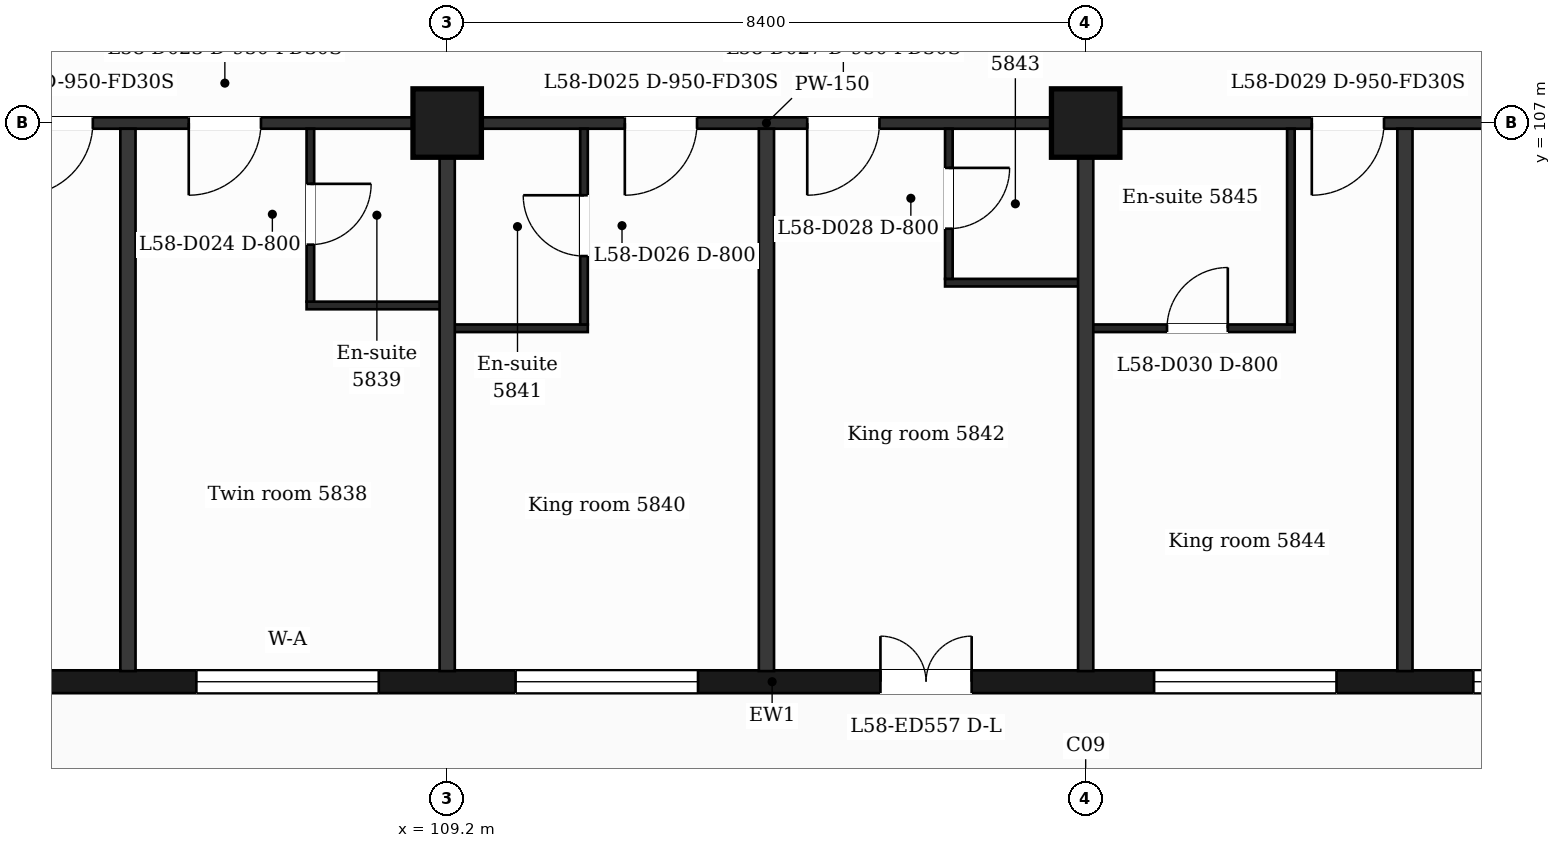
"""IFC4 building model, lengths in metres.
Left out: names, types, materials, properties, quantities, classifications, styles, units other than length and angle.
Written with IfcOpenShell. Run it as: python <this file> out.ifc"""

import sys

from ifc_helpers import new_model, si_unit, direction, frame, frame_2d, origin, origin_2d, place, context, subcontext, project, spatial, rectangle, extrude, element, fill, save


model = new_model("IFC4")
c1 = context("Model", 3, precision=1e-05, world=origin(), true_north=direction((0.0, 1.0)))
c2 = subcontext(c1, "Body", "Model", "MODEL_VIEW")
j1 = project(units=[si_unit("LENGTHUNIT", "METRE"), si_unit("PLANEANGLEUNIT", "RADIAN")], contexts=[c1])
p1 = place(None, origin())
s1 = spatial("IfcSite", under=j1, at=p1, CompositionType="ELEMENT")
p2 = place(p1, origin())
s2 = spatial("IfcBuilding", under=s1, at=p2, CompositionType="ELEMENT")
p3 = place(p2, frame((0.0, 0.0, 239.2)))
s3 = spatial("IfcBuildingStorey", under=s2, at=p3, CompositionType="ELEMENT", Elevation=239.2)
for number, where, z_axis, x_axis in (
    (1, (109.2, 107.0, 0.0), (0.0, 0.0, 1.0), (1.0, 0.0, 0.0)),
    (2, (117.6, 107.0, 0.0), (0.0, 0.0, 1.0), (1.0, 0.0, 0.0)),
):
    element("IfcColumn", number, at=place(p3, frame(where, z_axis=z_axis, x_axis=x_axis)), inside=s3, PredefinedType="COLUMN", context=c2, shape_type="SweptSolid", body=[
        extrude(rectangle(XDim=0.9, YDim=0.9, at=origin_2d()), origin(), (0.0, 0.0, 1.0), 3.7),
    ])
p4 = place(p3, frame((89.85, 99.65, 0.0), z_axis=(0.0, 0.0, 1.0), x_axis=(1.0, 0.0, 0.0)))
e3 = element("IfcWall", 3, at=p4, inside=s3, PredefinedType="SOLIDWALL", context=c2, shape_type="SweptSolid", body=[
    extrude(rectangle(XDim=47.25, YDim=0.3, at=frame_2d((23.625, 0.0))), origin(), (0.0, 0.0, 1.0), 3.38),
])
p5 = place(p4, frame((0.725, 0.0, 0.9)))
e4 = element("IfcOpeningElement", 4, at=p5, cuts=e3, PredefinedType="OPENING", context=c2, shape_type="SweptSolid", body=[
    extrude(rectangle(XDim=1.2, YDim=2.1, at=frame_2d((0.6, 1.05))), frame((0.0, 0.16, 0.0), z_axis=(0.0, -1.0, 0.0), x_axis=(1.0, 0.0, 0.0)), (0.0, 0.0, 1.0), 0.32),
])
p6 = place(p4, frame((3.45, 0.0, 0.9)))
e5 = element("IfcOpeningElement", 5, at=p6, cuts=e3, PredefinedType="OPENING", context=c2, shape_type="SweptSolid", body=[
    extrude(rectangle(XDim=2.4, YDim=2.1, at=frame_2d((1.2, 1.05))), frame((0.0, 0.16, 0.0), z_axis=(0.0, -1.0, 0.0), x_axis=(1.0, 0.0, 0.0)), (0.0, 0.0, 1.0), 0.32),
])
p7 = place(p4, frame((8.25, 0.0, 0.9)))
e6 = element("IfcOpeningElement", 6, at=p7, cuts=e3, PredefinedType="OPENING", context=c2, shape_type="SweptSolid", body=[
    extrude(rectangle(XDim=1.2, YDim=2.1, at=frame_2d((0.6, 1.05))), frame((0.0, 0.16, 0.0), z_axis=(0.0, -1.0, 0.0), x_axis=(1.0, 0.0, 0.0)), (0.0, 0.0, 1.0), 0.32),
])
p8 = place(p4, frame((12.45, 0.0, 0.9)))
e7 = element("IfcOpeningElement", 7, at=p8, cuts=e3, PredefinedType="OPENING", context=c2, shape_type="SweptSolid", body=[
    extrude(rectangle(XDim=1.2, YDim=2.1, at=frame_2d((0.6, 1.05))), frame((0.0, 0.16, 0.0), z_axis=(0.0, -1.0, 0.0), x_axis=(1.0, 0.0, 0.0)), (0.0, 0.0, 1.0), 0.32),
])
p9 = place(p4, frame((16.05, 0.0, 0.9)))
e8 = element("IfcOpeningElement", 8, at=p9, cuts=e3, PredefinedType="OPENING", context=c2, shape_type="SweptSolid", body=[
    extrude(rectangle(XDim=2.4, YDim=2.1, at=frame_2d((1.2, 1.05))), frame((0.0, 0.16, 0.0), z_axis=(0.0, -1.0, 0.0), x_axis=(1.0, 0.0, 0.0)), (0.0, 0.0, 1.0), 0.32),
])
p10 = place(p4, frame((20.25, 0.0, 0.9)))
e9 = element("IfcOpeningElement", 9, at=p10, cuts=e3, PredefinedType="OPENING", context=c2, shape_type="SweptSolid", body=[
    extrude(rectangle(XDim=2.4, YDim=2.1, at=frame_2d((1.2, 1.05))), frame((0.0, 0.16, 0.0), z_axis=(0.0, -1.0, 0.0), x_axis=(1.0, 0.0, 0.0)), (0.0, 0.0, 1.0), 0.32),
])
p11 = place(p4, frame((25.05, 0.0, 0.0)))
e10 = element("IfcOpeningElement", 10, at=p11, cuts=e3, PredefinedType="OPENING", context=c2, shape_type="SweptSolid", body=[
    extrude(rectangle(XDim=1.2, YDim=2.4, at=frame_2d((0.6, 1.2))), frame((0.0, 0.16, 0.0), z_axis=(0.0, -1.0, 0.0), x_axis=(1.0, 0.0, 0.0)), (0.0, 0.0, 1.0), 0.32),
])
p12 = place(p4, frame((28.65, 0.0, 0.9)))
e11 = element("IfcOpeningElement", 11, at=p12, cuts=e3, PredefinedType="OPENING", context=c2, shape_type="SweptSolid", body=[
    extrude(rectangle(XDim=2.4, YDim=2.1, at=frame_2d((1.2, 1.05))), frame((0.0, 0.16, 0.0), z_axis=(0.0, -1.0, 0.0), x_axis=(1.0, 0.0, 0.0)), (0.0, 0.0, 1.0), 0.32),
])
p13 = place(p4, frame((32.85, 0.0, 0.9)))
e12 = element("IfcOpeningElement", 12, at=p13, cuts=e3, PredefinedType="OPENING", context=c2, shape_type="SweptSolid", body=[
    extrude(rectangle(XDim=2.4, YDim=2.1, at=frame_2d((1.2, 1.05))), frame((0.0, 0.16, 0.0), z_axis=(0.0, -1.0, 0.0), x_axis=(1.0, 0.0, 0.0)), (0.0, 0.0, 1.0), 0.32),
])
p14 = place(p4, frame((37.65, 0.0, 0.9)))
e13 = element("IfcOpeningElement", 13, at=p14, cuts=e3, PredefinedType="OPENING", context=c2, shape_type="SweptSolid", body=[
    extrude(rectangle(XDim=1.2, YDim=2.1, at=frame_2d((0.6, 1.05))), frame((0.0, 0.16, 0.0), z_axis=(0.0, -1.0, 0.0), x_axis=(1.0, 0.0, 0.0)), (0.0, 0.0, 1.0), 0.32),
])
p15 = place(p4, frame((41.85, 0.0, 0.9)))
e14 = element("IfcOpeningElement", 14, at=p15, cuts=e3, PredefinedType="OPENING", context=c2, shape_type="SweptSolid", body=[
    extrude(rectangle(XDim=1.2, YDim=2.1, at=frame_2d((0.6, 1.05))), frame((0.0, 0.16, 0.0), z_axis=(0.0, -1.0, 0.0), x_axis=(1.0, 0.0, 0.0)), (0.0, 0.0, 1.0), 0.32),
])
p16 = place(p4, frame((45.25, 0.0, 0.9)))
e15 = element("IfcOpeningElement", 15, at=p16, cuts=e3, PredefinedType="OPENING", context=c2, shape_type="SweptSolid", body=[
    extrude(rectangle(XDim=1.2, YDim=2.1, at=frame_2d((0.6, 1.05))), frame((0.0, 0.16, 0.0), z_axis=(0.0, -1.0, 0.0), x_axis=(1.0, 0.0, 0.0)), (0.0, 0.0, 1.0), 0.32),
])
p17 = place(p3, frame((109.2, 104.3, 0.0), z_axis=(0.0, 0.0, 1.0), x_axis=(1.0, 0.0, 0.0)))
e16 = element("IfcWall", 16, at=p17, inside=s3, PredefinedType="PARTITIONING", context=c2, shape_type="SweptSolid", body=[
    extrude(rectangle(XDim=1.85, YDim=0.1, at=frame_2d((0.925, 0.0))), origin(), (0.0, 0.0, 1.0), 3.38),
])
p18 = place(p3, frame((117.6, 104.3, 0.0), z_axis=(0.0, 0.0, 1.0), x_axis=(1.0, 0.0, 0.0)))
e17 = element("IfcWall", 17, at=p18, inside=s3, PredefinedType="PARTITIONING", context=c2, shape_type="SweptSolid", body=[
    extrude(rectangle(XDim=2.75, YDim=0.1, at=frame_2d((1.375, 0.0))), origin(), (0.0, 0.0, 1.0), 3.38),
])
p19 = place(p18, frame((1.07, 0.0, 0.0)))
e18 = element("IfcOpeningElement", 18, at=p19, cuts=e17, PredefinedType="OPENING", context=c2, shape_type="SweptSolid", body=[
    extrude(rectangle(XDim=0.8, YDim=2.1, at=frame_2d((0.4, 1.05))), frame((0.0, 0.06, 0.0), z_axis=(0.0, -1.0, 0.0), x_axis=(1.0, 0.0, 0.0)), (0.0, 0.0, 1.0), 0.12),
])
p20 = place(p3, frame((107.35, 104.6, 0.0), z_axis=(0.0, 0.0, 1.0), x_axis=(1.0, 0.0, 0.0)))
e19 = element("IfcWall", 19, at=p20, inside=s3, PredefinedType="PARTITIONING", context=c2, shape_type="SweptSolid", body=[
    extrude(rectangle(XDim=1.85, YDim=0.1, at=frame_2d((0.925, 0.0))), origin(), (0.0, 0.0, 1.0), 3.38),
])
p21 = place(p3, frame((115.75, 104.9, 0.0), z_axis=(0.0, 0.0, 1.0), x_axis=(1.0, 0.0, 0.0)))
e20 = element("IfcWall", 20, at=p21, inside=s3, PredefinedType="PARTITIONING", context=c2, shape_type="SweptSolid", body=[
    extrude(rectangle(XDim=1.85, YDim=0.1, at=frame_2d((0.925, 0.0))), origin(), (0.0, 0.0, 1.0), 3.38),
])
p22 = place(p3, frame((87.018, 107.0, 0.0), z_axis=(0.0, 0.0, 1.0), x_axis=(1.0, 0.0, 0.0)))
e21 = element("IfcWall", 21, at=p22, inside=s3, PredefinedType="PARTITIONING", context=c2, shape_type="SweptSolid", body=[
    extrude(rectangle(XDim=52.765, YDim=0.15, at=frame_2d((26.382, 0.0))), origin(), (0.0, 0.0, 1.0), 3.38),
])
p23 = place(p22, frame((0.87, 0.0, 0.0)))
e22 = element("IfcOpeningElement", 22, at=p23, cuts=e21, PredefinedType="OPENING", context=c2, shape_type="SweptSolid", body=[
    extrude(rectangle(XDim=0.95, YDim=2.1, at=frame_2d((0.475, 1.05))), frame((0.0, 0.085, 0.0), z_axis=(0.0, -1.0, 0.0), x_axis=(1.0, 0.0, 0.0)), (0.0, 0.0, 1.0), 0.17),
])
p24 = place(p22, frame((7.757, 0.0, 0.0)))
e23 = element("IfcOpeningElement", 23, at=p24, cuts=e21, PredefinedType="OPENING", context=c2, shape_type="SweptSolid", body=[
    extrude(rectangle(XDim=0.95, YDim=2.1, at=frame_2d((0.475, 1.05))), frame((0.0, 0.085, 0.0), z_axis=(0.0, -1.0, 0.0), x_axis=(1.0, 0.0, 0.0)), (0.0, 0.0, 1.0), 0.17),
])
p25 = place(p22, frame((16.57, 0.0, 0.0)))
e24 = element("IfcOpeningElement", 24, at=p25, cuts=e21, PredefinedType="OPENING", context=c2, shape_type="SweptSolid", body=[
    extrude(rectangle(XDim=0.95, YDim=2.1, at=frame_2d((0.475, 1.05))), frame((0.0, 0.085, 0.0), z_axis=(0.0, -1.0, 0.0), x_axis=(1.0, 0.0, 0.0)), (0.0, 0.0, 1.0), 0.17),
])
p26 = place(p22, frame((18.782, 0.0, 0.0)))
e25 = element("IfcOpeningElement", 25, at=p26, cuts=e21, PredefinedType="OPENING", context=c2, shape_type="SweptSolid", body=[
    extrude(rectangle(XDim=0.95, YDim=2.1, at=frame_2d((0.475, 1.05))), frame((0.0, 0.085, 0.0), z_axis=(0.0, -1.0, 0.0), x_axis=(1.0, 0.0, 0.0)), (0.0, 0.0, 1.0), 0.17),
])
p27 = place(p22, frame((24.519, 0.0, 0.0)))
e26 = element("IfcOpeningElement", 26, at=p27, cuts=e21, PredefinedType="OPENING", context=c2, shape_type="SweptSolid", body=[
    extrude(rectangle(XDim=0.95, YDim=2.1, at=frame_2d((0.475, 1.05))), frame((0.0, 0.085, 0.0), z_axis=(0.0, -1.0, 0.0), x_axis=(1.0, 0.0, 0.0)), (0.0, 0.0, 1.0), 0.17),
])
p28 = place(p22, frame((26.919, 0.0, 0.0)))
e27 = element("IfcOpeningElement", 27, at=p28, cuts=e21, PredefinedType="OPENING", context=c2, shape_type="SweptSolid", body=[
    extrude(rectangle(XDim=0.95, YDim=2.1, at=frame_2d((0.475, 1.05))), frame((0.0, 0.085, 0.0), z_axis=(0.0, -1.0, 0.0), x_axis=(1.0, 0.0, 0.0)), (0.0, 0.0, 1.0), 0.17),
])
p29 = place(p22, frame((33.557, 0.0, 0.0)))
e28 = element("IfcOpeningElement", 28, at=p29, cuts=e21, PredefinedType="OPENING", context=c2, shape_type="SweptSolid", body=[
    extrude(rectangle(XDim=0.95, YDim=2.1, at=frame_2d((0.475, 1.05))), frame((0.0, 0.085, 0.0), z_axis=(0.0, -1.0, 0.0), x_axis=(1.0, 0.0, 0.0)), (0.0, 0.0, 1.0), 0.17),
])
p30 = place(p22, frame((40.157, 0.0, 0.0)))
e29 = element("IfcOpeningElement", 29, at=p30, cuts=e21, PredefinedType="OPENING", context=c2, shape_type="SweptSolid", body=[
    extrude(rectangle(XDim=1.0, YDim=2.1, at=frame_2d((0.5, 1.05))), frame((0.0, 0.085, 0.0), z_axis=(0.0, -1.0, 0.0), x_axis=(1.0, 0.0, 0.0)), (0.0, 0.0, 1.0), 0.17),
])
p31 = place(p22, frame((48.767, 0.0, 0.0)))
e30 = element("IfcOpeningElement", 30, at=p31, cuts=e21, PredefinedType="OPENING", context=c2, shape_type="SweptSolid", body=[
    extrude(rectangle(XDim=0.95, YDim=2.1, at=frame_2d((0.475, 1.05))), frame((0.0, 0.085, 0.0), z_axis=(0.0, -1.0, 0.0), x_axis=(1.0, 0.0, 0.0)), (0.0, 0.0, 1.0), 0.17),
])
p32 = place(p3, frame((105.0, 99.79, 0.0), z_axis=(0.0, 0.0, 1.0), x_axis=(0.0, 1.0, 0.0)))
e31 = element("IfcWall", 31, at=p32, inside=s3, PredefinedType="PARTITIONING", context=c2, shape_type="SweptSolid", body=[
    extrude(rectangle(XDim=7.135, YDim=0.2, at=frame_2d((3.567, 0.0))), origin(), (0.0, 0.0, 1.0), 3.38),
])
p33 = place(p3, frame((107.4, 104.65, 0.0), z_axis=(0.0, 0.0, 1.0), x_axis=(0.0, 1.0, 0.0)))
e32 = element("IfcWall", 32, at=p33, inside=s3, PredefinedType="PARTITIONING", context=c2, shape_type="SweptSolid", body=[
    extrude(rectangle(XDim=2.275, YDim=0.1, at=frame_2d((1.138, 0.0))), origin(), (0.0, 0.0, 1.0), 3.38),
])
p34 = place(p33, frame((0.75, 0.0, 0.0)))
e33 = element("IfcOpeningElement", 33, at=p34, cuts=e32, PredefinedType="OPENING", context=c2, shape_type="SweptSolid", body=[
    extrude(rectangle(XDim=0.8, YDim=2.1, at=frame_2d((0.4, 1.05))), frame((0.0, 0.06, 0.0), z_axis=(0.0, -1.0, 0.0), x_axis=(1.0, 0.0, 0.0)), (0.0, 0.0, 1.0), 0.12),
])
p35 = place(p3, frame((109.2, 99.79, 0.0), z_axis=(0.0, 0.0, 1.0), x_axis=(0.0, 1.0, 0.0)))
e34 = element("IfcWall", 34, at=p35, inside=s3, PredefinedType="PARTITIONING", context=c2, shape_type="SweptSolid", body=[
    extrude(rectangle(XDim=7.135, YDim=0.2, at=frame_2d((3.567, 0.0))), origin(), (0.0, 0.0, 1.0), 3.38),
])
p36 = place(p3, frame((111.0, 104.35, 0.0), z_axis=(0.0, 0.0, 1.0), x_axis=(0.0, 1.0, 0.0)))
e35 = element("IfcWall", 35, at=p36, inside=s3, PredefinedType="PARTITIONING", context=c2, shape_type="SweptSolid", body=[
    extrude(rectangle(XDim=2.575, YDim=0.1, at=frame_2d((1.288, 0.0))), origin(), (0.0, 0.0, 1.0), 3.38),
])
p37 = place(p36, frame((0.9, 0.0, 0.0)))
e36 = element("IfcOpeningElement", 36, at=p37, cuts=e35, PredefinedType="OPENING", context=c2, shape_type="SweptSolid", body=[
    extrude(rectangle(XDim=0.8, YDim=2.1, at=frame_2d((0.4, 1.05))), frame((0.0, 0.06, 0.0), z_axis=(0.0, -1.0, 0.0), x_axis=(1.0, 0.0, 0.0)), (0.0, 0.0, 1.0), 0.12),
])
p38 = place(p3, frame((113.4, 99.79, 0.0), z_axis=(0.0, 0.0, 1.0), x_axis=(0.0, 1.0, 0.0)))
e37 = element("IfcWall", 37, at=p38, inside=s3, PredefinedType="PARTITIONING", context=c2, shape_type="SweptSolid", body=[
    extrude(rectangle(XDim=7.135, YDim=0.2, at=frame_2d((3.567, 0.0))), origin(), (0.0, 0.0, 1.0), 3.38),
])
p39 = place(p3, frame((115.8, 104.95, 0.0), z_axis=(0.0, 0.0, 1.0), x_axis=(0.0, 1.0, 0.0)))
e38 = element("IfcWall", 38, at=p39, inside=s3, PredefinedType="PARTITIONING", context=c2, shape_type="SweptSolid", body=[
    extrude(rectangle(XDim=1.975, YDim=0.1, at=frame_2d((0.988, 0.0))), origin(), (0.0, 0.0, 1.0), 3.38),
])
p40 = place(p39, frame((0.66, 0.0, 0.0)))
e39 = element("IfcOpeningElement", 39, at=p40, cuts=e38, PredefinedType="OPENING", context=c2, shape_type="SweptSolid", body=[
    extrude(rectangle(XDim=0.8, YDim=2.1, at=frame_2d((0.4, 1.05))), frame((0.0, 0.06, 0.0), z_axis=(0.0, -1.0, 0.0), x_axis=(1.0, 0.0, 0.0)), (0.0, 0.0, 1.0), 0.12),
])
p41 = place(p3, frame((117.6, 99.79, 0.0), z_axis=(0.0, 0.0, 1.0), x_axis=(0.0, 1.0, 0.0)))
e40 = element("IfcWall", 40, at=p41, inside=s3, PredefinedType="PARTITIONING", context=c2, shape_type="SweptSolid", body=[
    extrude(rectangle(XDim=7.135, YDim=0.2, at=frame_2d((3.567, 0.0))), origin(), (0.0, 0.0, 1.0), 3.38),
])
p42 = place(p3, frame((120.3, 104.35, 0.0), z_axis=(0.0, 0.0, 1.0), x_axis=(0.0, 1.0, 0.0)))
e41 = element("IfcWall", 41, at=p42, inside=s3, PredefinedType="PARTITIONING", context=c2, shape_type="SweptSolid", body=[
    extrude(rectangle(XDim=2.575, YDim=0.1, at=frame_2d((1.288, 0.0))), origin(), (0.0, 0.0, 1.0), 3.38),
])
p43 = place(p3, frame((121.8, 99.79, 0.0), z_axis=(0.0, 0.0, 1.0), x_axis=(0.0, 1.0, 0.0)))
e42 = element("IfcWall", 42, at=p43, inside=s3, PredefinedType="PARTITIONING", context=c2, shape_type="SweptSolid", body=[
    extrude(rectangle(XDim=7.135, YDim=0.2, at=frame_2d((3.567, 0.0))), origin(), (0.0, 0.0, 1.0), 3.38),
])
p44 = place(p9, origin())
e43 = element("IfcWindow", 43, at=p44, inside=s3, PartitioningType="SINGLE_PANEL", PredefinedType="WINDOW", context=c2, shape_type="SweptSolid", body=[
    extrude(rectangle(XDim=2.4, YDim=2.1, at=frame_2d((1.2, 1.05))), frame((0.0, 0.03, 0.0), z_axis=(0.0, -1.0, 0.0), x_axis=(1.0, 0.0, 0.0)), (0.0, 0.0, 1.0), 0.06),
])
fill(e8, e43)
p45 = place(p10, origin())
e44 = element("IfcWindow", 44, at=p45, inside=s3, PartitioningType="SINGLE_PANEL", PredefinedType="WINDOW", context=c2, shape_type="SweptSolid", body=[
    extrude(rectangle(XDim=2.4, YDim=2.1, at=frame_2d((1.2, 1.05))), frame((0.0, 0.03, 0.0), z_axis=(0.0, -1.0, 0.0), x_axis=(1.0, 0.0, 0.0)), (0.0, 0.0, 1.0), 0.06),
])
fill(e9, e44)
p46 = place(p11, origin())
e45 = element("IfcDoor", 45, at=p46, inside=s3, OperationType="DOUBLE_DOOR_SINGLE_SWING", PredefinedType="DOOR", context=c2, shape_type="SweptSolid", body=[
    extrude(rectangle(XDim=1.2, YDim=2.4, at=frame_2d((0.6, 1.2))), frame((0.0, 0.025, 0.0), z_axis=(0.0, -1.0, 0.0), x_axis=(1.0, 0.0, 0.0)), (0.0, 0.0, 1.0), 0.05),
])
fill(e10, e45)
p47 = place(p12, origin())
e46 = element("IfcWindow", 46, at=p47, inside=s3, PartitioningType="SINGLE_PANEL", PredefinedType="WINDOW", context=c2, shape_type="SweptSolid", body=[
    extrude(rectangle(XDim=2.4, YDim=2.1, at=frame_2d((1.2, 1.05))), frame((0.0, 0.03, 0.0), z_axis=(0.0, -1.0, 0.0), x_axis=(1.0, 0.0, 0.0)), (0.0, 0.0, 1.0), 0.06),
])
fill(e11, e46)
p48 = place(p13, origin())
e47 = element("IfcWindow", 47, at=p48, inside=s3, PartitioningType="SINGLE_PANEL", PredefinedType="WINDOW", context=c2, shape_type="SweptSolid", body=[
    extrude(rectangle(XDim=2.4, YDim=2.1, at=frame_2d((1.2, 1.05))), frame((0.0, 0.03, 0.0), z_axis=(0.0, -1.0, 0.0), x_axis=(1.0, 0.0, 0.0)), (0.0, 0.0, 1.0), 0.06),
])
fill(e12, e47)
p49 = place(p25, origin())
e48 = element("IfcDoor", 48, at=p49, inside=s3, OperationType="SINGLE_SWING_LEFT", PredefinedType="DOOR", context=c2, shape_type="SweptSolid", body=[
    extrude(rectangle(XDim=0.95, YDim=2.1, at=frame_2d((0.475, 1.05))), frame((0.0, 0.025, 0.0), z_axis=(0.0, -1.0, 0.0), x_axis=(1.0, 0.0, 0.0)), (0.0, 0.0, 1.0), 0.05),
])
fill(e24, e48)
p50 = place(p26, origin())
e49 = element("IfcDoor", 49, at=p50, inside=s3, OperationType="SINGLE_SWING_LEFT", PredefinedType="DOOR", context=c2, shape_type="SweptSolid", body=[
    extrude(rectangle(XDim=0.95, YDim=2.1, at=frame_2d((0.475, 1.05))), frame((0.0, 0.025, 0.0), z_axis=(0.0, -1.0, 0.0), x_axis=(1.0, 0.0, 0.0)), (0.0, 0.0, 1.0), 0.05),
])
fill(e25, e49)
p51 = place(p34, origin())
e50 = element("IfcDoor", 50, at=p51, inside=s3, OperationType="SINGLE_SWING_RIGHT", PredefinedType="DOOR", context=c2, shape_type="SweptSolid", body=[
    extrude(rectangle(XDim=0.8, YDim=2.1, at=frame_2d((0.4, 1.05))), frame((0.0, 0.025, 0.0), z_axis=(0.0, -1.0, 0.0), x_axis=(1.0, 0.0, 0.0)), (0.0, 0.0, 1.0), 0.05),
])
fill(e33, e50)
p52 = place(p27, origin())
e51 = element("IfcDoor", 51, at=p52, inside=s3, OperationType="SINGLE_SWING_LEFT", PredefinedType="DOOR", context=c2, shape_type="SweptSolid", body=[
    extrude(rectangle(XDim=0.95, YDim=2.1, at=frame_2d((0.475, 1.05))), frame((0.0, 0.025, 0.0), z_axis=(0.0, -1.0, 0.0), x_axis=(1.0, 0.0, 0.0)), (0.0, 0.0, 1.0), 0.05),
])
fill(e26, e51)
p53 = place(p37, origin())
e52 = element("IfcDoor", 52, at=p53, inside=s3, OperationType="SINGLE_SWING_RIGHT", PredefinedType="DOOR", context=c2, shape_type="SweptSolid", body=[
    extrude(rectangle(XDim=0.8, YDim=2.1, at=frame_2d((0.4, 1.05))), frame((0.0, 0.025, 0.0), z_axis=(0.0, -1.0, 0.0), x_axis=(1.0, 0.0, 0.0)), (0.0, 0.0, 1.0), 0.05),
])
fill(e36, e52)
p54 = place(p28, origin())
e53 = element("IfcDoor", 53, at=p54, inside=s3, OperationType="SINGLE_SWING_LEFT", PredefinedType="DOOR", context=c2, shape_type="SweptSolid", body=[
    extrude(rectangle(XDim=0.95, YDim=2.1, at=frame_2d((0.475, 1.05))), frame((0.0, 0.025, 0.0), z_axis=(0.0, -1.0, 0.0), x_axis=(1.0, 0.0, 0.0)), (0.0, 0.0, 1.0), 0.05),
])
fill(e27, e53)
p55 = place(p40, origin())
e54 = element("IfcDoor", 54, at=p55, inside=s3, OperationType="SINGLE_SWING_RIGHT", PredefinedType="DOOR", context=c2, shape_type="SweptSolid", body=[
    extrude(rectangle(XDim=0.8, YDim=2.1, at=frame_2d((0.4, 1.05))), frame((0.0, 0.025, 0.0), z_axis=(0.0, -1.0, 0.0), x_axis=(1.0, 0.0, 0.0)), (0.0, 0.0, 1.0), 0.05),
])
fill(e39, e54)
p56 = place(p29, origin())
e55 = element("IfcDoor", 55, at=p56, inside=s3, OperationType="SINGLE_SWING_LEFT", PredefinedType="DOOR", context=c2, shape_type="SweptSolid", body=[
    extrude(rectangle(XDim=0.95, YDim=2.1, at=frame_2d((0.475, 1.05))), frame((0.0, 0.025, 0.0), z_axis=(0.0, -1.0, 0.0), x_axis=(1.0, 0.0, 0.0)), (0.0, 0.0, 1.0), 0.05),
])
fill(e28, e55)
p57 = place(p19, origin())
e56 = element("IfcDoor", 56, at=p57, inside=s3, OperationType="SINGLE_SWING_RIGHT", PredefinedType="DOOR", context=c2, shape_type="SweptSolid", body=[
    extrude(rectangle(XDim=0.8, YDim=2.1, at=frame_2d((0.4, 1.05))), frame((0.0, 0.025, 0.0), z_axis=(0.0, -1.0, 0.0), x_axis=(1.0, 0.0, 0.0)), (0.0, 0.0, 1.0), 0.05),
])
fill(e18, e56)
save(model, sys.argv[1])
